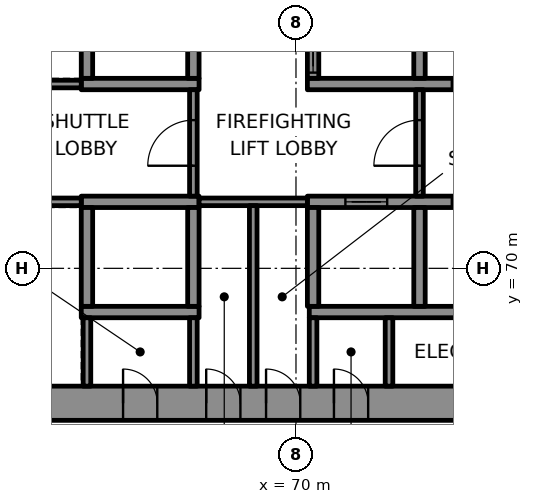
"""IFC4 building model, lengths in metres.
Left out: names, types, materials, properties, quantities, classifications, styles, units other than length and angle.
Written with IfcOpenShell. Run it as: python <this file> out.ifc"""

import sys

from ifc_helpers import new_model, si_unit, direction, frame, frame_2d, origin, place, context, subcontext, project, spatial, rectangle, extrude, element, fill, save


model = new_model("IFC4")
c1 = context("Model", 3, precision=1e-05, world=origin(), true_north=direction((0.0, 1.0)))
c2 = subcontext(c1, "Body", "Model", "MODEL_VIEW")
j1 = project(units=[si_unit("LENGTHUNIT", "METRE"), si_unit("PLANEANGLEUNIT", "RADIAN")], contexts=[c1])
p1 = place(None, origin())
s1 = spatial("IfcSite", under=j1, at=p1, CompositionType="ELEMENT")
p2 = place(p1, origin())
s2 = spatial("IfcBuilding", under=s1, at=p2, CompositionType="ELEMENT")
p3 = place(p2, frame((0.0, 0.0, 35.5)))
s3 = spatial("IfcBuildingStorey", under=s2, at=p3, CompositionType="ELEMENT", Elevation=35.5)
p4 = place(p3, frame((62.0, 66.45, 0.0), z_axis=(0.0, 0.0, 1.0), x_axis=(1.0, 0.0, 0.0)))
e1 = element("IfcWall", 1, at=p4, inside=s3, PredefinedType="SHEAR", context=c2, shape_type="SweptSolid", body=[
    extrude(rectangle(XDim=26.0, YDim=0.9, at=frame_2d((13.0, 0.0))), origin(), (0.0, 0.0, 1.0), 4.3),
])
p5 = place(p4, frame((3.45, 0.0, 0.0)))
e2 = element("IfcOpeningElement", 2, at=p5, cuts=e1, PredefinedType="OPENING", context=c2, shape_type="SweptSolid", body=[
    extrude(rectangle(XDim=0.9, YDim=2.1, at=frame_2d((0.45, 1.05))), frame((0.0, 0.46, 0.0), z_axis=(0.0, -1.0, 0.0), x_axis=(1.0, 0.0, 0.0)), (0.0, 0.0, 1.0), 0.92),
])
p6 = place(p4, frame((5.637, 0.0, 0.0)))
e3 = element("IfcOpeningElement", 3, at=p6, cuts=e1, PredefinedType="OPENING", context=c2, shape_type="SweptSolid", body=[
    extrude(rectangle(XDim=0.9, YDim=2.1, at=frame_2d((0.45, 1.05))), frame((0.0, 0.46, 0.0), z_axis=(0.0, -1.0, 0.0), x_axis=(1.0, 0.0, 0.0)), (0.0, 0.0, 1.0), 0.92),
])
p7 = place(p4, frame((7.212, 0.0, 0.0)))
e4 = element("IfcOpeningElement", 4, at=p7, cuts=e1, PredefinedType="OPENING", context=c2, shape_type="SweptSolid", body=[
    extrude(rectangle(XDim=0.9, YDim=2.1, at=frame_2d((0.45, 1.05))), frame((0.0, 0.46, 0.0), z_axis=(0.0, -1.0, 0.0), x_axis=(1.0, 0.0, 0.0)), (0.0, 0.0, 1.0), 0.92),
])
p8 = place(p4, frame((8.999, 0.0, 0.0)))
e5 = element("IfcOpeningElement", 5, at=p8, cuts=e1, PredefinedType="OPENING", context=c2, shape_type="SweptSolid", body=[
    extrude(rectangle(XDim=0.9, YDim=2.1, at=frame_2d((0.45, 1.05))), frame((0.0, 0.46, 0.0), z_axis=(0.0, -1.0, 0.0), x_axis=(1.0, 0.0, 0.0)), (0.0, 0.0, 1.0), 0.92),
])
p9 = place(p4, frame((17.324, 0.0, 0.0)))
e6 = element("IfcOpeningElement", 6, at=p9, cuts=e1, PredefinedType="OPENING", context=c2, shape_type="SweptSolid", body=[
    extrude(rectangle(XDim=0.9, YDim=2.1, at=frame_2d((0.45, 1.05))), frame((0.0, 0.46, 0.0), z_axis=(0.0, -1.0, 0.0), x_axis=(1.0, 0.0, 0.0)), (0.0, 0.0, 1.0), 0.92),
])
p10 = place(p3, frame((64.35, 68.85, 0.0), z_axis=(0.0, 0.0, 1.0), x_axis=(1.0, 0.0, 0.0)))
e7 = element("IfcWall", 7, at=p10, inside=s3, PredefinedType="SHEAR", context=c2, shape_type="SweptSolid", body=[
    extrude(rectangle(XDim=3.1, YDim=0.3, at=frame_2d((1.55, 0.0))), origin(), (0.0, 0.0, 1.0), 4.3),
])
p11 = place(p3, frame((70.35, 68.85, 0.0), z_axis=(0.0, 0.0, 1.0), x_axis=(1.0, 0.0, 0.0)))
e8 = element("IfcWall", 8, at=p11, inside=s3, PredefinedType="SHEAR", context=c2, shape_type="SweptSolid", body=[
    extrude(rectangle(XDim=16.75, YDim=0.3, at=frame_2d((8.375, 0.0))), origin(), (0.0, 0.0, 1.0), 4.3),
])
p12 = place(p3, frame((64.35, 71.75, 0.0), z_axis=(0.0, 0.0, 1.0), x_axis=(1.0, 0.0, 0.0)))
e9 = element("IfcWall", 9, at=p12, inside=s3, PredefinedType="SHEAR", context=c2, shape_type="SweptSolid", body=[
    extrude(rectangle(XDim=3.1, YDim=0.3, at=frame_2d((1.55, 0.0))), origin(), (0.0, 0.0, 1.0), 4.3),
])
p13 = place(p3, frame((70.3, 71.75, 0.0), z_axis=(0.0, 0.0, 1.0), x_axis=(1.0, 0.0, 0.0)))
e10 = element("IfcWall", 10, at=p13, inside=s3, PredefinedType="SHEAR", context=c2, shape_type="SweptSolid", body=[
    extrude(rectangle(XDim=16.8, YDim=0.3, at=frame_2d((8.4, 0.0))), origin(), (0.0, 0.0, 1.0), 4.3),
])
p14 = place(p13, frame((1.0, 0.0, 0.0)))
e11 = element("IfcOpeningElement", 11, at=p14, cuts=e10, PredefinedType="OPENING", context=c2, shape_type="SweptSolid", body=[
    extrude(rectangle(XDim=1.1, YDim=2.1, at=frame_2d((0.55, 1.05))), frame((0.0, 0.16, 0.0), z_axis=(0.0, -1.0, 0.0), x_axis=(1.0, 0.0, 0.0)), (0.0, 0.0, 1.0), 0.32),
])
p15 = place(p13, frame((3.8, 0.0, 0.0)))
e12 = element("IfcOpeningElement", 12, at=p15, cuts=e10, PredefinedType="OPENING", context=c2, shape_type="SweptSolid", body=[
    extrude(rectangle(XDim=1.1, YDim=2.1, at=frame_2d((0.55, 1.05))), frame((0.0, 0.16, 0.0), z_axis=(0.0, -1.0, 0.0), x_axis=(1.0, 0.0, 0.0)), (0.0, 0.0, 1.0), 0.32),
])
p16 = place(p13, frame((6.6, 0.0, 0.0)))
e13 = element("IfcOpeningElement", 13, at=p16, cuts=e10, PredefinedType="OPENING", context=c2, shape_type="SweptSolid", body=[
    extrude(rectangle(XDim=1.1, YDim=2.1, at=frame_2d((0.55, 1.05))), frame((0.0, 0.16, 0.0), z_axis=(0.0, -1.0, 0.0), x_axis=(1.0, 0.0, 0.0)), (0.0, 0.0, 1.0), 0.32),
])
p17 = place(p13, frame((9.4, 0.0, 0.0)))
e14 = element("IfcOpeningElement", 14, at=p17, cuts=e10, PredefinedType="OPENING", context=c2, shape_type="SweptSolid", body=[
    extrude(rectangle(XDim=1.1, YDim=2.1, at=frame_2d((0.55, 1.05))), frame((0.0, 0.16, 0.0), z_axis=(0.0, -1.0, 0.0), x_axis=(1.0, 0.0, 0.0)), (0.0, 0.0, 1.0), 0.32),
])
p18 = place(p13, frame((12.2, 0.0, 0.0)))
e15 = element("IfcOpeningElement", 15, at=p18, cuts=e10, PredefinedType="OPENING", context=c2, shape_type="SweptSolid", body=[
    extrude(rectangle(XDim=1.1, YDim=2.1, at=frame_2d((0.55, 1.05))), frame((0.0, 0.16, 0.0), z_axis=(0.0, -1.0, 0.0), x_axis=(1.0, 0.0, 0.0)), (0.0, 0.0, 1.0), 0.32),
])
p19 = place(p13, frame((14.925, 0.0, 0.0)))
e16 = element("IfcOpeningElement", 16, at=p19, cuts=e10, PredefinedType="OPENING", context=c2, shape_type="SweptSolid", body=[
    extrude(rectangle(XDim=1.1, YDim=2.1, at=frame_2d((0.55, 1.05))), frame((0.0, 0.16, 0.0), z_axis=(0.0, -1.0, 0.0), x_axis=(1.0, 0.0, 0.0)), (0.0, 0.0, 1.0), 0.32),
])
p20 = place(p3, frame((64.35, 74.85, 0.0), z_axis=(0.0, 0.0, 1.0), x_axis=(1.0, 0.0, 0.0)))
e17 = element("IfcWall", 17, at=p20, inside=s3, PredefinedType="SHEAR", context=c2, shape_type="SweptSolid", body=[
    extrude(rectangle(XDim=3.1, YDim=0.3, at=frame_2d((1.55, 0.0))), origin(), (0.0, 0.0, 1.0), 4.3),
])
p21 = place(p3, frame((70.3, 74.85, 0.0), z_axis=(0.0, 0.0, 1.0), x_axis=(1.0, 0.0, 0.0)))
e18 = element("IfcWall", 18, at=p21, inside=s3, PredefinedType="SHEAR", context=c2, shape_type="SweptSolid", body=[
    extrude(rectangle(XDim=16.8, YDim=0.3, at=frame_2d((8.4, 0.0))), origin(), (0.0, 0.0, 1.0), 4.3),
])
p22 = place(p21, frame((3.8, 0.0, 0.0)))
e19 = element("IfcOpeningElement", 19, at=p22, cuts=e18, PredefinedType="OPENING", context=c2, shape_type="SweptSolid", body=[
    extrude(rectangle(XDim=1.1, YDim=2.1, at=frame_2d((0.55, 1.05))), frame((0.0, 0.16, 0.0), z_axis=(0.0, -1.0, 0.0), x_axis=(1.0, 0.0, 0.0)), (0.0, 0.0, 1.0), 0.32),
])
p23 = place(p21, frame((12.2, 0.0, 0.0)))
e20 = element("IfcOpeningElement", 20, at=p23, cuts=e18, PredefinedType="OPENING", context=c2, shape_type="SweptSolid", body=[
    extrude(rectangle(XDim=1.1, YDim=2.1, at=frame_2d((0.55, 1.05))), frame((0.0, 0.16, 0.0), z_axis=(0.0, -1.0, 0.0), x_axis=(1.0, 0.0, 0.0)), (0.0, 0.0, 1.0), 0.32),
])
p24 = place(p21, frame((14.925, 0.0, 0.0)))
e21 = element("IfcOpeningElement", 21, at=p24, cuts=e18, PredefinedType="OPENING", context=c2, shape_type="SweptSolid", body=[
    extrude(rectangle(XDim=1.1, YDim=2.1, at=frame_2d((0.55, 1.05))), frame((0.0, 0.16, 0.0), z_axis=(0.0, -1.0, 0.0), x_axis=(1.0, 0.0, 0.0)), (0.0, 0.0, 1.0), 0.32),
])
for number, where, z_axis, x_axis in (
    (22, (64.5, 69.0, 0.0), (0.0, 0.0, 1.0), (0.0, 1.0, 0.0)),
    (23, (64.5, 75.0, 0.0), (0.0, 0.0, 1.0), (0.0, 1.0, 0.0)),
    (24, (67.3, 69.0, 0.0), (0.0, 0.0, 1.0), (0.0, 1.0, 0.0)),
    (25, (67.3, 75.0, 0.0), (0.0, 0.0, 1.0), (0.0, 1.0, 0.0)),
    (26, (70.45, 69.0, 0.0), (0.0, 0.0, 1.0), (0.0, 1.0, 0.0)),
):
    element("IfcWall", number, at=place(p3, frame(where, z_axis=z_axis, x_axis=x_axis)), inside=s3, PredefinedType="SHEAR", context=c2, shape_type="SweptSolid", body=[
        extrude(rectangle(XDim=2.6, YDim=0.3, at=frame_2d((1.3, 0.0))), origin(), (0.0, 0.0, 1.0), 4.3),
    ])
p25 = place(p3, frame((70.45, 75.0, 0.0), z_axis=(0.0, 0.0, 1.0), x_axis=(0.0, 1.0, 0.0)))
e27 = element("IfcWall", 27, at=p25, inside=s3, PredefinedType="SHEAR", context=c2, shape_type="SweptSolid", body=[
    extrude(rectangle(XDim=2.6, YDim=0.3, at=frame_2d((1.3, 0.0))), origin(), (0.0, 0.0, 1.0), 4.3),
])
p26 = place(p25, frame((0.15, 0.0, 0.0)))
e28 = element("IfcOpeningElement", 28, at=p26, cuts=e27, PredefinedType="OPENING", context=c2, shape_type="SweptSolid", body=[
    extrude(rectangle(XDim=1.1, YDim=2.1, at=frame_2d((0.55, 1.05))), frame((0.0, 0.16, 0.0), z_axis=(0.0, -1.0, 0.0), x_axis=(1.0, 0.0, 0.0)), (0.0, 0.0, 1.0), 0.32),
])
for number, where, z_axis, x_axis in (
    (29, (73.25, 69.0, 0.0), (0.0, 0.0, 1.0), (0.0, 1.0, 0.0)),
    (30, (73.25, 75.0, 0.0), (0.0, 0.0, 1.0), (0.0, 1.0, 0.0)),
):
    element("IfcWall", number, at=place(p3, frame(where, z_axis=z_axis, x_axis=x_axis)), inside=s3, PredefinedType="SHEAR", context=c2, shape_type="SweptSolid", body=[
        extrude(rectangle(XDim=2.6, YDim=0.3, at=frame_2d((1.3, 0.0))), origin(), (0.0, 0.0, 1.0), 4.3),
    ])
p27 = place(p3, frame((71.348, 110.424, 0.0), z_axis=(0.0, 0.0, 1.0), x_axis=(-0.500000550228, -0.86602508611, 0.0)))
e31 = element("IfcWall", 31, at=p27, inside=s3, PredefinedType="SOLIDWALL", context=c2, shape_type="SweptSolid", body=[
    extrude(rectangle(XDim=57.704, YDim=0.3, at=frame_2d((28.852, 0.0))), origin(), (0.0, 0.0, 1.0), 4.3),
])
p28 = place(p27, frame((0.89, 0.0, 0.8)))
e32 = element("IfcOpeningElement", 32, at=p28, cuts=e31, PredefinedType="OPENING", context=c2, shape_type="SweptSolid", body=[
    extrude(rectangle(XDim=3.0, YDim=2.4, at=frame_2d((1.5, 1.2))), frame((0.0, 0.16, 0.0), z_axis=(0.0, -1.0, 0.0), x_axis=(1.0, 0.0, 0.0)), (0.0, 0.0, 1.0), 0.32),
])
p29 = place(p27, frame((4.67, 0.0, 0.8)))
e33 = element("IfcOpeningElement", 33, at=p29, cuts=e31, PredefinedType="OPENING", context=c2, shape_type="SweptSolid", body=[
    extrude(rectangle(XDim=3.0, YDim=2.4, at=frame_2d((1.5, 1.2))), frame((0.0, 0.16, 0.0), z_axis=(0.0, -1.0, 0.0), x_axis=(1.0, 0.0, 0.0)), (0.0, 0.0, 1.0), 0.32),
])
p30 = place(p27, frame((8.451, 0.0, 0.8)))
e34 = element("IfcOpeningElement", 34, at=p30, cuts=e31, PredefinedType="OPENING", context=c2, shape_type="SweptSolid", body=[
    extrude(rectangle(XDim=3.0, YDim=2.4, at=frame_2d((1.5, 1.2))), frame((0.0, 0.16, 0.0), z_axis=(0.0, -1.0, 0.0), x_axis=(1.0, 0.0, 0.0)), (0.0, 0.0, 1.0), 0.32),
])
p31 = place(p27, frame((12.231, 0.0, 0.8)))
e35 = element("IfcOpeningElement", 35, at=p31, cuts=e31, PredefinedType="OPENING", context=c2, shape_type="SweptSolid", body=[
    extrude(rectangle(XDim=3.0, YDim=2.4, at=frame_2d((1.5, 1.2))), frame((0.0, 0.16, 0.0), z_axis=(0.0, -1.0, 0.0), x_axis=(1.0, 0.0, 0.0)), (0.0, 0.0, 1.0), 0.32),
])
p32 = place(p27, frame((16.011, 0.0, 0.8)))
e36 = element("IfcOpeningElement", 36, at=p32, cuts=e31, PredefinedType="OPENING", context=c2, shape_type="SweptSolid", body=[
    extrude(rectangle(XDim=3.0, YDim=2.4, at=frame_2d((1.5, 1.2))), frame((0.0, 0.16, 0.0), z_axis=(0.0, -1.0, 0.0), x_axis=(1.0, 0.0, 0.0)), (0.0, 0.0, 1.0), 0.32),
])
p33 = place(p27, frame((19.792, 0.0, 0.8)))
e37 = element("IfcOpeningElement", 37, at=p33, cuts=e31, PredefinedType="OPENING", context=c2, shape_type="SweptSolid", body=[
    extrude(rectangle(XDim=3.0, YDim=2.4, at=frame_2d((1.5, 1.2))), frame((0.0, 0.16, 0.0), z_axis=(0.0, -1.0, 0.0), x_axis=(1.0, 0.0, 0.0)), (0.0, 0.0, 1.0), 0.32),
])
p34 = place(p27, frame((23.572, 0.0, 0.8)))
e38 = element("IfcOpeningElement", 38, at=p34, cuts=e31, PredefinedType="OPENING", context=c2, shape_type="SweptSolid", body=[
    extrude(rectangle(XDim=3.0, YDim=2.4, at=frame_2d((1.5, 1.2))), frame((0.0, 0.16, 0.0), z_axis=(0.0, -1.0, 0.0), x_axis=(1.0, 0.0, 0.0)), (0.0, 0.0, 1.0), 0.32),
])
p35 = place(p27, frame((27.352, 0.0, 0.8)))
e39 = element("IfcOpeningElement", 39, at=p35, cuts=e31, PredefinedType="OPENING", context=c2, shape_type="SweptSolid", body=[
    extrude(rectangle(XDim=3.0, YDim=2.4, at=frame_2d((1.5, 1.2))), frame((0.0, 0.16, 0.0), z_axis=(0.0, -1.0, 0.0), x_axis=(1.0, 0.0, 0.0)), (0.0, 0.0, 1.0), 0.32),
])
p36 = place(p27, frame((31.132, 0.0, 0.8)))
e40 = element("IfcOpeningElement", 40, at=p36, cuts=e31, PredefinedType="OPENING", context=c2, shape_type="SweptSolid", body=[
    extrude(rectangle(XDim=3.0, YDim=2.4, at=frame_2d((1.5, 1.2))), frame((0.0, 0.16, 0.0), z_axis=(0.0, -1.0, 0.0), x_axis=(1.0, 0.0, 0.0)), (0.0, 0.0, 1.0), 0.32),
])
p37 = place(p27, frame((34.913, 0.0, 0.8)))
e41 = element("IfcOpeningElement", 41, at=p37, cuts=e31, PredefinedType="OPENING", context=c2, shape_type="SweptSolid", body=[
    extrude(rectangle(XDim=3.0, YDim=2.4, at=frame_2d((1.5, 1.2))), frame((0.0, 0.16, 0.0), z_axis=(0.0, -1.0, 0.0), x_axis=(1.0, 0.0, 0.0)), (0.0, 0.0, 1.0), 0.32),
])
p38 = place(p27, frame((38.693, 0.0, 0.8)))
e42 = element("IfcOpeningElement", 42, at=p38, cuts=e31, PredefinedType="OPENING", context=c2, shape_type="SweptSolid", body=[
    extrude(rectangle(XDim=3.0, YDim=2.4, at=frame_2d((1.5, 1.2))), frame((0.0, 0.16, 0.0), z_axis=(0.0, -1.0, 0.0), x_axis=(1.0, 0.0, 0.0)), (0.0, 0.0, 1.0), 0.32),
])
p39 = place(p27, frame((42.473, 0.0, 0.8)))
e43 = element("IfcOpeningElement", 43, at=p39, cuts=e31, PredefinedType="OPENING", context=c2, shape_type="SweptSolid", body=[
    extrude(rectangle(XDim=3.0, YDim=2.4, at=frame_2d((1.5, 1.2))), frame((0.0, 0.16, 0.0), z_axis=(0.0, -1.0, 0.0), x_axis=(1.0, 0.0, 0.0)), (0.0, 0.0, 1.0), 0.32),
])
p40 = place(p27, frame((46.253, 0.0, 0.8)))
e44 = element("IfcOpeningElement", 44, at=p40, cuts=e31, PredefinedType="OPENING", context=c2, shape_type="SweptSolid", body=[
    extrude(rectangle(XDim=3.0, YDim=2.4, at=frame_2d((1.5, 1.2))), frame((0.0, 0.16, 0.0), z_axis=(0.0, -1.0, 0.0), x_axis=(1.0, 0.0, 0.0)), (0.0, 0.0, 1.0), 0.32),
])
p41 = place(p27, frame((50.033, 0.0, 0.8)))
e45 = element("IfcOpeningElement", 45, at=p41, cuts=e31, PredefinedType="OPENING", context=c2, shape_type="SweptSolid", body=[
    extrude(rectangle(XDim=3.0, YDim=2.4, at=frame_2d((1.5, 1.2))), frame((0.0, 0.16, 0.0), z_axis=(0.0, -1.0, 0.0), x_axis=(1.0, 0.0, 0.0)), (0.0, 0.0, 1.0), 0.32),
])
p42 = place(p27, frame((53.814, 0.0, 0.8)))
e46 = element("IfcOpeningElement", 46, at=p42, cuts=e31, PredefinedType="OPENING", context=c2, shape_type="SweptSolid", body=[
    extrude(rectangle(XDim=3.0, YDim=2.4, at=frame_2d((1.5, 1.2))), frame((0.0, 0.16, 0.0), z_axis=(0.0, -1.0, 0.0), x_axis=(1.0, 0.0, 0.0)), (0.0, 0.0, 1.0), 0.32),
])
p43 = place(p3, frame((62.9, 71.75, 0.0), z_axis=(0.0, 0.0, 1.0), x_axis=(1.0, 0.0, 0.0)))
e47 = element("IfcWall", 47, at=p43, inside=s3, PredefinedType="PARTITIONING", context=c2, shape_type="SweptSolid", body=[
    extrude(rectangle(XDim=1.45, YDim=0.2, at=frame_2d((0.725, 0.0))), origin(), (0.0, 0.0, 1.0), 4.3),
])
p44 = place(p3, frame((67.45, 71.75, 0.0), z_axis=(0.0, 0.0, 1.0), x_axis=(1.0, 0.0, 0.0)))
e48 = element("IfcWall", 48, at=p44, inside=s3, PredefinedType="PARTITIONING", context=c2, shape_type="SweptSolid", body=[
    extrude(rectangle(XDim=2.85, YDim=0.2, at=frame_2d((1.425, 0.0))), origin(), (0.0, 0.0, 1.0), 4.3),
])
p45 = place(p3, frame((62.9, 74.85, 0.0), z_axis=(0.0, 0.0, 1.0), x_axis=(1.0, 0.0, 0.0)))
e49 = element("IfcWall", 49, at=p45, inside=s3, PredefinedType="PARTITIONING", context=c2, shape_type="SweptSolid", body=[
    extrude(rectangle(XDim=1.45, YDim=0.2, at=frame_2d((0.725, 0.0))), origin(), (0.0, 0.0, 1.0), 4.3),
])
for number, where, z_axis, x_axis in (
    (50, (64.5, 66.9, 0.0), (0.0, 0.0, 1.0), (0.0, 1.0, 0.0)),
    (51, (67.3, 66.9, 0.0), (0.0, 0.0, 1.0), (0.0, 1.0, 0.0)),
):
    element("IfcWall", number, at=place(p3, frame(where, z_axis=z_axis, x_axis=x_axis)), inside=s3, PredefinedType="PARTITIONING", context=c2, shape_type="SweptSolid", body=[
        extrude(rectangle(XDim=1.8, YDim=0.2, at=frame_2d((0.9, 0.0))), origin(), (0.0, 0.0, 1.0), 4.3),
    ])
p46 = place(p3, frame((67.3, 71.9, 0.0), z_axis=(0.0, 0.0, 1.0), x_axis=(0.0, 1.0, 0.0)))
e52 = element("IfcWall", 52, at=p46, inside=s3, PredefinedType="PARTITIONING", context=c2, shape_type="SweptSolid", body=[
    extrude(rectangle(XDim=2.8, YDim=0.2, at=frame_2d((1.4, 0.0))), origin(), (0.0, 0.0, 1.0), 4.3),
])
p47 = place(p46, frame((0.8, 0.0, 0.0)))
e53 = element("IfcOpeningElement", 53, at=p47, cuts=e52, PredefinedType="OPENING", context=c2, shape_type="SweptSolid", body=[
    extrude(rectangle(XDim=1.2, YDim=2.1, at=frame_2d((0.6, 1.05))), frame((0.0, 0.11, 0.0), z_axis=(0.0, -1.0, 0.0), x_axis=(1.0, 0.0, 0.0)), (0.0, 0.0, 1.0), 0.22),
])
p48 = place(p3, frame((68.875, 66.9, 0.0), z_axis=(0.0, 0.0, 1.0), x_axis=(0.0, 1.0, 0.0)))
e54 = element("IfcWall", 54, at=p48, inside=s3, PredefinedType="PARTITIONING", context=c2, shape_type="SweptSolid", body=[
    extrude(rectangle(XDim=4.75, YDim=0.2, at=frame_2d((2.375, 0.0))), origin(), (0.0, 0.0, 1.0), 4.3),
])
for number, where, z_axis, x_axis in (
    (55, (70.45, 66.9, 0.0), (0.0, 0.0, 1.0), (0.0, 1.0, 0.0)),
    (56, (72.448, 66.9, 0.0), (0.0, 0.0, 1.0), (0.0, 1.0, 0.0)),
):
    element("IfcWall", number, at=place(p3, frame(where, z_axis=z_axis, x_axis=x_axis)), inside=s3, PredefinedType="PARTITIONING", context=c2, shape_type="SweptSolid", body=[
        extrude(rectangle(XDim=1.8, YDim=0.2, at=frame_2d((0.9, 0.0))), origin(), (0.0, 0.0, 1.0), 4.3),
    ])
p49 = place(p3, frame((73.25, 71.9, 0.0), z_axis=(0.0, 0.0, 1.0), x_axis=(0.0, 1.0, 0.0)))
e57 = element("IfcWall", 57, at=p49, inside=s3, PredefinedType="PARTITIONING", context=c2, shape_type="SweptSolid", body=[
    extrude(rectangle(XDim=2.8, YDim=0.2, at=frame_2d((1.4, 0.0))), origin(), (0.0, 0.0, 1.0), 4.3),
])
p50 = place(p49, frame((0.8, 0.0, 0.0)))
e58 = element("IfcOpeningElement", 58, at=p50, cuts=e57, PredefinedType="OPENING", context=c2, shape_type="SweptSolid", body=[
    extrude(rectangle(XDim=1.2, YDim=2.1, at=frame_2d((0.6, 1.05))), frame((0.0, 0.11, 0.0), z_axis=(0.0, -1.0, 0.0), x_axis=(1.0, 0.0, 0.0)), (0.0, 0.0, 1.0), 0.22),
])
p51 = place(p14, origin())
e59 = element("IfcDoor", 59, at=p51, inside=s3, OperationType="DOUBLE_DOOR_SLIDING", PredefinedType="DOOR", context=c2, shape_type="SweptSolid", body=[
    extrude(rectangle(XDim=1.1, YDim=2.1, at=frame_2d((0.55, 1.05))), frame((0.0, 0.025, 0.0), z_axis=(0.0, -1.0, 0.0), x_axis=(1.0, 0.0, 0.0)), (0.0, 0.0, 1.0), 0.05),
])
fill(e11, e59)
p52 = place(p15, origin())
e60 = element("IfcDoor", 60, at=p52, inside=s3, OperationType="DOUBLE_DOOR_SLIDING", PredefinedType="DOOR", context=c2, shape_type="SweptSolid", body=[
    extrude(rectangle(XDim=1.1, YDim=2.1, at=frame_2d((0.55, 1.05))), frame((0.0, 0.025, 0.0), z_axis=(0.0, -1.0, 0.0), x_axis=(1.0, 0.0, 0.0)), (0.0, 0.0, 1.0), 0.05),
])
fill(e12, e60)
p53 = place(p26, origin())
e61 = element("IfcDoor", 61, at=p53, inside=s3, OperationType="DOUBLE_DOOR_SLIDING", PredefinedType="DOOR", context=c2, shape_type="SweptSolid", body=[
    extrude(rectangle(XDim=1.1, YDim=2.1, at=frame_2d((0.55, 1.05))), frame((0.0, 0.025, 0.0), z_axis=(0.0, -1.0, 0.0), x_axis=(1.0, 0.0, 0.0)), (0.0, 0.0, 1.0), 0.05),
])
fill(e28, e61)
p54 = place(p22, origin())
e62 = element("IfcDoor", 62, at=p54, inside=s3, OperationType="DOUBLE_DOOR_SLIDING", PredefinedType="DOOR", context=c2, shape_type="SweptSolid", body=[
    extrude(rectangle(XDim=1.1, YDim=2.1, at=frame_2d((0.55, 1.05))), frame((0.0, 0.025, 0.0), z_axis=(0.0, -1.0, 0.0), x_axis=(1.0, 0.0, 0.0)), (0.0, 0.0, 1.0), 0.05),
])
fill(e19, e62)
p55 = place(p50, origin())
e63 = element("IfcDoor", 63, at=p55, inside=s3, OperationType="SINGLE_SWING_LEFT", PredefinedType="DOOR", context=c2, shape_type="SweptSolid", body=[
    extrude(rectangle(XDim=1.2, YDim=2.1, at=frame_2d((0.6, 1.05))), frame((0.0, 0.025, 0.0), z_axis=(0.0, -1.0, 0.0), x_axis=(1.0, 0.0, 0.0)), (0.0, 0.0, 1.0), 0.05),
])
fill(e58, e63)
p56 = place(p47, origin())
e64 = element("IfcDoor", 64, at=p56, inside=s3, OperationType="SINGLE_SWING_RIGHT", PredefinedType="DOOR", context=c2, shape_type="SweptSolid", body=[
    extrude(rectangle(XDim=1.2, YDim=2.1, at=frame_2d((0.6, 1.05))), frame((0.0, 0.025, 0.0), z_axis=(0.0, -1.0, 0.0), x_axis=(1.0, 0.0, 0.0)), (0.0, 0.0, 1.0), 0.05),
])
fill(e53, e64)
p57 = place(p5, origin())
e65 = element("IfcDoor", 65, at=p57, inside=s3, OperationType="SINGLE_SWING_LEFT", PredefinedType="DOOR", context=c2, shape_type="SweptSolid", body=[
    extrude(rectangle(XDim=0.9, YDim=2.1, at=frame_2d((0.45, 1.05))), frame((0.0, 0.17, 0.0), z_axis=(0.0, -1.0, 0.0), x_axis=(1.0, 0.0, 0.0)), (0.0, 0.0, 1.0), 0.34),
])
fill(e2, e65)
p58 = place(p6, origin())
e66 = element("IfcDoor", 66, at=p58, inside=s3, OperationType="SINGLE_SWING_RIGHT", PredefinedType="DOOR", context=c2, shape_type="SweptSolid", body=[
    extrude(rectangle(XDim=0.9, YDim=2.1, at=frame_2d((0.45, 1.05))), frame((0.0, 0.17, 0.0), z_axis=(0.0, -1.0, 0.0), x_axis=(1.0, 0.0, 0.0)), (0.0, 0.0, 1.0), 0.34),
])
fill(e3, e66)
p59 = place(p7, origin())
e67 = element("IfcDoor", 67, at=p59, inside=s3, OperationType="SINGLE_SWING_LEFT", PredefinedType="DOOR", context=c2, shape_type="SweptSolid", body=[
    extrude(rectangle(XDim=0.9, YDim=2.1, at=frame_2d((0.45, 1.05))), frame((0.0, 0.17, 0.0), z_axis=(0.0, -1.0, 0.0), x_axis=(1.0, 0.0, 0.0)), (0.0, 0.0, 1.0), 0.34),
])
fill(e4, e67)
p60 = place(p8, origin())
e68 = element("IfcDoor", 68, at=p60, inside=s3, OperationType="SINGLE_SWING_RIGHT", PredefinedType="DOOR", context=c2, shape_type="SweptSolid", body=[
    extrude(rectangle(XDim=0.9, YDim=2.1, at=frame_2d((0.45, 1.05))), frame((0.0, 0.17, 0.0), z_axis=(0.0, -1.0, 0.0), x_axis=(1.0, 0.0, 0.0)), (0.0, 0.0, 1.0), 0.34),
])
fill(e5, e68)
save(model, sys.argv[1])
